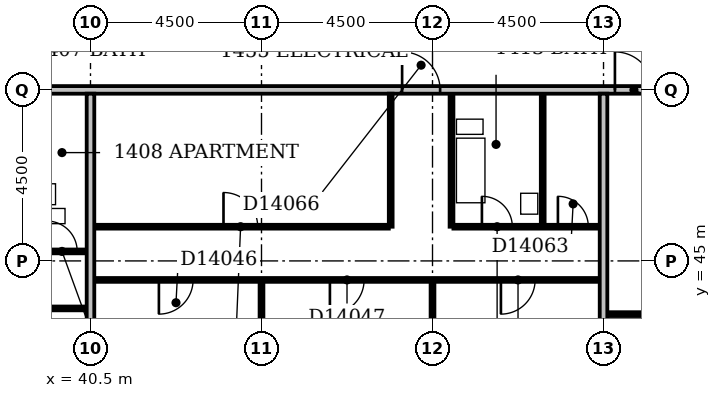
"""IFC4 building model, lengths in metres.
Left out: names, types, materials, properties, quantities, classifications, styles, units other than length and angle.
Written with IfcOpenShell. Run it as: python <this file> out.ifc"""

import sys

from ifc_helpers import new_model, si_unit, direction, frame, frame_2d, origin, place, context, subcontext, project, spatial, rectangle, extrude, element, fill, save


model = new_model("IFC4")
c1 = context("Model", 3, precision=1e-05, world=origin(), true_north=direction((0.0, 1.0)))
c2 = subcontext(c1, "Body", "Model", "MODEL_VIEW")
j1 = project(units=[si_unit("LENGTHUNIT", "METRE"), si_unit("PLANEANGLEUNIT", "RADIAN")], contexts=[c1])
p1 = place(None, origin())
s1 = spatial("IfcSite", under=j1, at=p1, CompositionType="ELEMENT")
p2 = place(p1, origin())
s2 = spatial("IfcBuilding", under=s1, at=p2, CompositionType="ELEMENT")
p3 = place(p2, frame((0.0, 0.0, 61.4)))
s3 = spatial("IfcBuildingStorey", under=s2, at=p3, CompositionType="ELEMENT", Elevation=61.4)
p4 = place(p3, frame((40.5, 36.6, 0.0), z_axis=(0.0, 0.0, 1.0), x_axis=(0.0, 1.0, 0.0)))
e1 = element("IfcWall", 1, at=p4, inside=s3, PredefinedType="PARTITIONING", context=c2, shape_type="SweptSolid", body=[
    extrude(rectangle(XDim=12.8, YDim=0.2, at=frame_2d((6.4, 0.0))), origin(), (0.0, 0.0, 1.0), 3.3),
])
p5 = place(p3, frame((45.0, 36.6, 0.0), z_axis=(0.0, 0.0, 1.0), x_axis=(0.0, 1.0, 0.0)))
e2 = element("IfcWall", 2, at=p5, inside=s3, PredefinedType="PARTITIONING", context=c2, shape_type="SweptSolid", body=[
    extrude(rectangle(XDim=7.85, YDim=0.1, at=frame_2d((3.925, 0.0))), origin(), (0.0, 0.0, 1.0), 2.6),
])
p6 = place(p3, frame((49.5, 36.6, 0.0), z_axis=(0.0, 0.0, 1.0), x_axis=(0.0, 1.0, 0.0)))
e3 = element("IfcWall", 3, at=p6, inside=s3, PredefinedType="PARTITIONING", context=c2, shape_type="SweptSolid", body=[
    extrude(rectangle(XDim=7.85, YDim=0.1, at=frame_2d((3.925, 0.0))), origin(), (0.0, 0.0, 1.0), 3.3),
])
p7 = place(p3, frame((54.0, 36.6, 0.0), z_axis=(0.0, 0.0, 1.0), x_axis=(0.0, 1.0, 0.0)))
e4 = element("IfcWall", 4, at=p7, inside=s3, PredefinedType="PARTITIONING", context=c2, shape_type="SweptSolid", body=[
    extrude(rectangle(XDim=12.8, YDim=0.2, at=frame_2d((6.4, 0.0))), origin(), (0.0, 0.0, 1.0), 2.6),
])
p8 = place(p3, frame((54.1, 43.6, 0.0), z_axis=(0.0, 0.0, 1.0), x_axis=(1.0, 0.0, 0.0)))
e5 = element("IfcWall", 5, at=p8, inside=s3, PredefinedType="PARTITIONING", context=c2, shape_type="SweptSolid", body=[
    extrude(rectangle(XDim=8.8, YDim=0.1, at=frame_2d((4.4, 0.0))), origin(), (0.0, 0.0, 1.0), 3.3),
])
p9 = place(p8, frame((1.7, 0.0, 0.0)))
e6 = element("IfcOpeningElement", 6, at=p9, cuts=e5, PredefinedType="OPENING", context=c2, shape_type="SweptSolid", body=[
    extrude(rectangle(XDim=0.9, YDim=2.1, at=frame_2d((0.45, 1.05))), frame((0.0, 0.062, 0.0), z_axis=(0.0, -1.0, 0.0), x_axis=(1.0, 0.0, 0.0)), (0.0, 0.0, 1.0), 0.124),
])
p10 = place(p8, frame((6.2, 0.0, 0.0)))
e7 = element("IfcOpeningElement", 7, at=p10, cuts=e5, PredefinedType="OPENING", context=c2, shape_type="SweptSolid", body=[
    extrude(rectangle(XDim=0.9, YDim=2.1, at=frame_2d((0.45, 1.05))), frame((0.0, 0.062, 0.0), z_axis=(0.0, -1.0, 0.0), x_axis=(1.0, 0.0, 0.0)), (0.0, 0.0, 1.0), 0.124),
])
p11 = place(p3, frame((27.1, 43.75, 0.0), z_axis=(0.0, 0.0, 1.0), x_axis=(1.0, 0.0, 0.0)))
e8 = element("IfcWall", 8, at=p11, inside=s3, PredefinedType="PARTITIONING", context=c2, shape_type="SweptSolid", body=[
    extrude(rectangle(XDim=13.3, YDim=0.1, at=frame_2d((6.65, 0.0))), origin(), (0.0, 0.0, 1.0), 3.3),
])
p12 = place(p11, frame((3.9, 0.0, 0.0)))
e9 = element("IfcOpeningElement", 9, at=p12, cuts=e8, PredefinedType="OPENING", context=c2, shape_type="SweptSolid", body=[
    extrude(rectangle(XDim=0.9, YDim=2.1, at=frame_2d((0.45, 1.05))), frame((0.0, 0.062, 0.0), z_axis=(0.0, -1.0, 0.0), x_axis=(1.0, 0.0, 0.0)), (0.0, 0.0, 1.0), 0.124),
])
p13 = place(p11, frame((10.7, 0.0, 0.0)))
e10 = element("IfcOpeningElement", 10, at=p13, cuts=e8, PredefinedType="OPENING", context=c2, shape_type="SweptSolid", body=[
    extrude(rectangle(XDim=0.9, YDim=2.1, at=frame_2d((0.45, 1.05))), frame((0.0, 0.062, 0.0), z_axis=(0.0, -1.0, 0.0), x_axis=(1.0, 0.0, 0.0)), (0.0, 0.0, 1.0), 0.124),
])
p14 = place(p3, frame((40.6, 44.5, 0.0), z_axis=(0.0, 0.0, 1.0), x_axis=(1.0, 0.0, 0.0)))
e11 = element("IfcWall", 11, at=p14, inside=s3, PredefinedType="PARTITIONING", context=c2, shape_type="SweptSolid", body=[
    extrude(rectangle(XDim=13.3, YDim=0.1, at=frame_2d((6.65, 0.0))), origin(), (0.0, 0.0, 1.0), 3.3),
])
p15 = place(p14, frame((1.7, 0.0, 0.0)))
e12 = element("IfcOpeningElement", 12, at=p15, cuts=e11, PredefinedType="OPENING", context=c2, shape_type="SweptSolid", body=[
    extrude(rectangle(XDim=0.9, YDim=2.1, at=frame_2d((0.45, 1.05))), frame((0.0, 0.062, 0.0), z_axis=(0.0, -1.0, 0.0), x_axis=(1.0, 0.0, 0.0)), (0.0, 0.0, 1.0), 0.124),
])
p16 = place(p14, frame((6.2, 0.0, 0.0)))
e13 = element("IfcOpeningElement", 13, at=p16, cuts=e11, PredefinedType="OPENING", context=c2, shape_type="SweptSolid", body=[
    extrude(rectangle(XDim=0.9, YDim=2.1, at=frame_2d((0.45, 1.05))), frame((0.0, 0.062, 0.0), z_axis=(0.0, -1.0, 0.0), x_axis=(1.0, 0.0, 0.0)), (0.0, 0.0, 1.0), 0.124),
])
p17 = place(p14, frame((10.7, 0.0, 0.0)))
e14 = element("IfcOpeningElement", 14, at=p17, cuts=e11, PredefinedType="OPENING", context=c2, shape_type="SweptSolid", body=[
    extrude(rectangle(XDim=0.9, YDim=2.1, at=frame_2d((0.45, 1.05))), frame((0.0, 0.062, 0.0), z_axis=(0.0, -1.0, 0.0), x_axis=(1.0, 0.0, 0.0)), (0.0, 0.0, 1.0), 0.124),
])
p18 = place(p3, frame((28.65, 45.25, 0.0), z_axis=(0.0, 0.0, 1.0), x_axis=(1.0, 0.0, 0.0)))
e15 = element("IfcWall", 15, at=p18, inside=s3, PredefinedType="PARTITIONING", context=c2, shape_type="SweptSolid", body=[
    extrude(rectangle(XDim=11.75, YDim=0.1, at=frame_2d((5.875, 0.0))), origin(), (0.0, 0.0, 1.0), 3.3),
])
p19 = place(p18, frame((8.75, 0.0, 0.0)))
e16 = element("IfcOpeningElement", 16, at=p19, cuts=e15, PredefinedType="OPENING", context=c2, shape_type="SweptSolid", body=[
    extrude(rectangle(XDim=0.8, YDim=2.1, at=frame_2d((0.4, 1.05))), frame((0.0, 0.062, 0.0), z_axis=(0.0, -1.0, 0.0), x_axis=(1.0, 0.0, 0.0)), (0.0, 0.0, 1.0), 0.124),
])
p20 = place(p18, frame((3.5, 0.0, 0.0)))
e17 = element("IfcOpeningElement", 17, at=p20, cuts=e15, PredefinedType="OPENING", context=c2, shape_type="SweptSolid", body=[
    extrude(rectangle(XDim=0.9, YDim=2.1, at=frame_2d((0.45, 1.05))), frame((0.0, 0.062, 0.0), z_axis=(0.0, -1.0, 0.0), x_axis=(1.0, 0.0, 0.0)), (0.0, 0.0, 1.0), 0.124),
])
p21 = place(p18, frame((10.7, 0.0, 0.0)))
e18 = element("IfcOpeningElement", 18, at=p21, cuts=e15, PredefinedType="OPENING", context=c2, shape_type="SweptSolid", body=[
    extrude(rectangle(XDim=0.8, YDim=2.1, at=frame_2d((0.4, 1.05))), frame((0.0, 0.062, 0.0), z_axis=(0.0, -1.0, 0.0), x_axis=(1.0, 0.0, 0.0)), (0.0, 0.0, 1.0), 0.124),
])
p22 = place(p3, frame((40.6, 45.9, 0.0), z_axis=(0.0, 0.0, 1.0), x_axis=(1.0, 0.0, 0.0)))
e19 = element("IfcWall", 19, at=p22, inside=s3, PredefinedType="PARTITIONING", context=c2, shape_type="SweptSolid", body=[
    extrude(rectangle(XDim=7.75, YDim=0.1, at=frame_2d((3.875, 0.0))), origin(), (0.0, 0.0, 1.0), 3.3),
])
p23 = place(p22, frame((3.4, 0.0, 0.0)))
e20 = element("IfcOpeningElement", 20, at=p23, cuts=e19, PredefinedType="OPENING", context=c2, shape_type="SweptSolid", body=[
    extrude(rectangle(XDim=0.9, YDim=2.1, at=frame_2d((0.45, 1.05))), frame((0.0, 0.062, 0.0), z_axis=(0.0, -1.0, 0.0), x_axis=(1.0, 0.0, 0.0)), (0.0, 0.0, 1.0), 0.124),
])
p24 = place(p3, frame((48.4, 45.9, 0.0), z_axis=(0.0, 0.0, 1.0), x_axis=(0.0, 1.0, 0.0)))
e21 = element("IfcWall", 21, at=p24, inside=s3, PredefinedType="PARTITIONING", context=c2, shape_type="SweptSolid", body=[
    extrude(rectangle(XDim=3.5, YDim=0.1, at=frame_2d((1.75, 0.0))), origin(), (0.0, 0.0, 1.0), 3.3),
])
p25 = place(p3, frame((50.0, 45.9, 0.0), z_axis=(0.0, 0.0, 1.0), x_axis=(0.0, 1.0, 0.0)))
e22 = element("IfcWall", 22, at=p25, inside=s3, PredefinedType="PLUMBINGWALL", context=c2, shape_type="SweptSolid", body=[
    extrude(rectangle(XDim=3.5, YDim=0.1, at=frame_2d((1.75, 0.0))), origin(), (0.0, 0.0, 1.0), 3.3),
])
p26 = place(p3, frame((50.05, 45.9, 0.0), z_axis=(0.0, 0.0, 1.0), x_axis=(1.0, 0.0, 0.0)))
e23 = element("IfcWall", 23, at=p26, inside=s3, PredefinedType="PARTITIONING", context=c2, shape_type="SweptSolid", body=[
    extrude(rectangle(XDim=3.85, YDim=0.1, at=frame_2d((1.925, 0.0))), origin(), (0.0, 0.0, 1.0), 3.3),
])
p27 = place(p26, frame((0.75, 0.0, 0.0)))
e24 = element("IfcOpeningElement", 24, at=p27, cuts=e23, PredefinedType="OPENING", context=c2, shape_type="SweptSolid", body=[
    extrude(rectangle(XDim=0.8, YDim=2.1, at=frame_2d((0.4, 1.05))), frame((0.0, 0.062, 0.0), z_axis=(0.0, -1.0, 0.0), x_axis=(1.0, 0.0, 0.0)), (0.0, 0.0, 1.0), 0.124),
])
p28 = place(p26, frame((2.75, 0.0, 0.0)))
e25 = element("IfcOpeningElement", 25, at=p28, cuts=e23, PredefinedType="OPENING", context=c2, shape_type="SweptSolid", body=[
    extrude(rectangle(XDim=0.8, YDim=2.1, at=frame_2d((0.4, 1.05))), frame((0.0, 0.062, 0.0), z_axis=(0.0, -1.0, 0.0), x_axis=(1.0, 0.0, 0.0)), (0.0, 0.0, 1.0), 0.124),
])
p29 = place(p3, frame((52.4, 45.95, 0.0), z_axis=(0.0, 0.0, 1.0), x_axis=(0.0, 1.0, 0.0)))
e26 = element("IfcWall", 26, at=p29, inside=s3, PredefinedType="PLUMBINGWALL", context=c2, shape_type="SweptSolid", body=[
    extrude(rectangle(XDim=3.45, YDim=0.1, at=frame_2d((1.725, 0.0))), origin(), (0.0, 0.0, 1.0), 3.3),
])
p30 = place(p3, frame((9.1, 49.5, 0.0), z_axis=(0.0, 0.0, 1.0), x_axis=(1.0, 0.0, 0.0)))
e27 = element("IfcWall", 27, at=p30, inside=s3, PredefinedType="PARTITIONING", context=c2, shape_type="SweptSolid", body=[
    extrude(rectangle(XDim=57.8, YDim=0.2, at=frame_2d((28.9, 0.0))), origin(), (0.0, 0.0, 1.0), 3.3),
])
p31 = place(p30, frame((15.35, 0.0, 0.0)))
e28 = element("IfcOpeningElement", 28, at=p31, cuts=e27, PredefinedType="OPENING", context=c2, shape_type="SweptSolid", body=[
    extrude(rectangle(XDim=1.0, YDim=2.1, at=frame_2d((0.5, 1.05))), frame((0.0, 0.112, 0.0), z_axis=(0.0, -1.0, 0.0), x_axis=(1.0, 0.0, 0.0)), (0.0, 0.0, 1.0), 0.224),
])
p32 = place(p30, frame((18.2, 0.0, 0.0)))
e29 = element("IfcOpeningElement", 29, at=p32, cuts=e27, PredefinedType="OPENING", context=c2, shape_type="SweptSolid", body=[
    extrude(rectangle(XDim=1.0, YDim=2.1, at=frame_2d((0.5, 1.05))), frame((0.0, 0.112, 0.0), z_axis=(0.0, -1.0, 0.0), x_axis=(1.0, 0.0, 0.0)), (0.0, 0.0, 1.0), 0.224),
])
p33 = place(p30, frame((39.6, 0.0, 0.0)))
e30 = element("IfcOpeningElement", 30, at=p33, cuts=e27, PredefinedType="OPENING", context=c2, shape_type="SweptSolid", body=[
    extrude(rectangle(XDim=1.0, YDim=2.1, at=frame_2d((0.5, 1.05))), frame((0.0, 0.112, 0.0), z_axis=(0.0, -1.0, 0.0), x_axis=(1.0, 0.0, 0.0)), (0.0, 0.0, 1.0), 0.224),
])
p34 = place(p30, frame((45.2, 0.0, 0.0)))
e31 = element("IfcOpeningElement", 31, at=p34, cuts=e27, PredefinedType="OPENING", context=c2, shape_type="SweptSolid", body=[
    extrude(rectangle(XDim=1.0, YDim=2.1, at=frame_2d((0.5, 1.05))), frame((0.0, 0.112, 0.0), z_axis=(0.0, -1.0, 0.0), x_axis=(1.0, 0.0, 0.0)), (0.0, 0.0, 1.0), 0.224),
])
p35 = place(p30, frame((54.15, 0.0, 0.0)))
e32 = element("IfcOpeningElement", 32, at=p35, cuts=e27, PredefinedType="OPENING", context=c2, shape_type="SweptSolid", body=[
    extrude(rectangle(XDim=1.0, YDim=2.1, at=frame_2d((0.5, 1.05))), frame((0.0, 0.112, 0.0), z_axis=(0.0, -1.0, 0.0), x_axis=(1.0, 0.0, 0.0)), (0.0, 0.0, 1.0), 0.224),
])
p36 = place(p30, frame((6.15, 0.0, 0.0)))
e33 = element("IfcOpeningElement", 33, at=p36, cuts=e27, PredefinedType="OPENING", context=c2, shape_type="SweptSolid", body=[
    extrude(rectangle(XDim=0.9, YDim=2.1, at=frame_2d((0.45, 1.05))), frame((0.0, 0.112, 0.0), z_axis=(0.0, -1.0, 0.0), x_axis=(1.0, 0.0, 0.0)), (0.0, 0.0, 1.0), 0.224),
])
p37 = place(p15, frame((0.9, 0.0, 0.0), z_axis=(0.0, 0.0, 1.0), x_axis=(-1.0, 0.0, 0.0)))
e34 = element("IfcDoor", 34, at=p37, inside=s3, OperationType="SINGLE_SWING_RIGHT", PredefinedType="DOOR", context=c2, shape_type="SweptSolid", body=[
    extrude(rectangle(XDim=0.9, YDim=2.1, at=frame_2d((0.45, 1.05))), frame((0.0, 0.025, 0.0), z_axis=(0.0, -1.0, 0.0), x_axis=(1.0, 0.0, 0.0)), (0.0, 0.0, 1.0), 0.05),
])
fill(e12, e34)
p38 = place(p16, frame((0.9, 0.0, 0.0), z_axis=(0.0, 0.0, 1.0), x_axis=(-1.0, 0.0, 0.0)))
e35 = element("IfcDoor", 35, at=p38, inside=s3, OperationType="SINGLE_SWING_RIGHT", PredefinedType="DOOR", context=c2, shape_type="SweptSolid", body=[
    extrude(rectangle(XDim=0.9, YDim=2.1, at=frame_2d((0.45, 1.05))), frame((0.0, 0.025, 0.0), z_axis=(0.0, -1.0, 0.0), x_axis=(1.0, 0.0, 0.0)), (0.0, 0.0, 1.0), 0.05),
])
fill(e13, e35)
p39 = place(p17, frame((0.9, 0.0, 0.0), z_axis=(0.0, 0.0, 1.0), x_axis=(-1.0, 0.0, 0.0)))
e36 = element("IfcDoor", 36, at=p39, inside=s3, OperationType="SINGLE_SWING_RIGHT", PredefinedType="DOOR", context=c2, shape_type="SweptSolid", body=[
    extrude(rectangle(XDim=0.9, YDim=2.1, at=frame_2d((0.45, 1.05))), frame((0.0, 0.025, 0.0), z_axis=(0.0, -1.0, 0.0), x_axis=(1.0, 0.0, 0.0)), (0.0, 0.0, 1.0), 0.05),
])
fill(e14, e36)
p40 = place(p21, origin())
e37 = element("IfcDoor", 37, at=p40, inside=s3, OperationType="SINGLE_SWING_LEFT", PredefinedType="DOOR", context=c2, shape_type="SweptSolid", body=[
    extrude(rectangle(XDim=0.8, YDim=2.1, at=frame_2d((0.4, 1.05))), frame((0.0, 0.025, 0.0), z_axis=(0.0, -1.0, 0.0), x_axis=(1.0, 0.0, 0.0)), (0.0, 0.0, 1.0), 0.05),
])
fill(e18, e37)
p41 = place(p23, origin())
e38 = element("IfcDoor", 38, at=p41, inside=s3, OperationType="SINGLE_SWING_LEFT", PredefinedType="DOOR", context=c2, shape_type="SweptSolid", body=[
    extrude(rectangle(XDim=0.9, YDim=2.1, at=frame_2d((0.45, 1.05))), frame((0.0, 0.025, 0.0), z_axis=(0.0, -1.0, 0.0), x_axis=(1.0, 0.0, 0.0)), (0.0, 0.0, 1.0), 0.05),
])
fill(e20, e38)
p42 = place(p27, origin())
e39 = element("IfcDoor", 39, at=p42, inside=s3, OperationType="SINGLE_SWING_LEFT", PredefinedType="DOOR", context=c2, shape_type="SweptSolid", body=[
    extrude(rectangle(XDim=0.8, YDim=2.1, at=frame_2d((0.4, 1.05))), frame((0.0, 0.025, 0.0), z_axis=(0.0, -1.0, 0.0), x_axis=(1.0, 0.0, 0.0)), (0.0, 0.0, 1.0), 0.05),
])
fill(e24, e39)
p43 = place(p28, origin())
e40 = element("IfcDoor", 40, at=p43, inside=s3, OperationType="SINGLE_SWING_LEFT", PredefinedType="DOOR", context=c2, shape_type="SweptSolid", body=[
    extrude(rectangle(XDim=0.8, YDim=2.1, at=frame_2d((0.4, 1.05))), frame((0.0, 0.025, 0.0), z_axis=(0.0, -1.0, 0.0), x_axis=(1.0, 0.0, 0.0)), (0.0, 0.0, 1.0), 0.05),
])
fill(e25, e40)
p44 = place(p33, origin())
e41 = element("IfcDoor", 41, at=p44, inside=s3, OperationType="SINGLE_SWING_LEFT", PredefinedType="DOOR", context=c2, shape_type="SweptSolid", body=[
    extrude(rectangle(XDim=1.0, YDim=2.1, at=frame_2d((0.5, 1.05))), frame((0.0, 0.025, 0.0), z_axis=(0.0, -1.0, 0.0), x_axis=(1.0, 0.0, 0.0)), (0.0, 0.0, 1.0), 0.05),
])
fill(e30, e41)
p45 = place(p34, origin())
e42 = element("IfcDoor", 42, at=p45, inside=s3, OperationType="SINGLE_SWING_LEFT", PredefinedType="DOOR", context=c2, shape_type="SweptSolid", body=[
    extrude(rectangle(XDim=1.0, YDim=2.1, at=frame_2d((0.5, 1.05))), frame((0.0, 0.025, 0.0), z_axis=(0.0, -1.0, 0.0), x_axis=(1.0, 0.0, 0.0)), (0.0, 0.0, 1.0), 0.05),
])
fill(e31, e42)
save(model, sys.argv[1])
